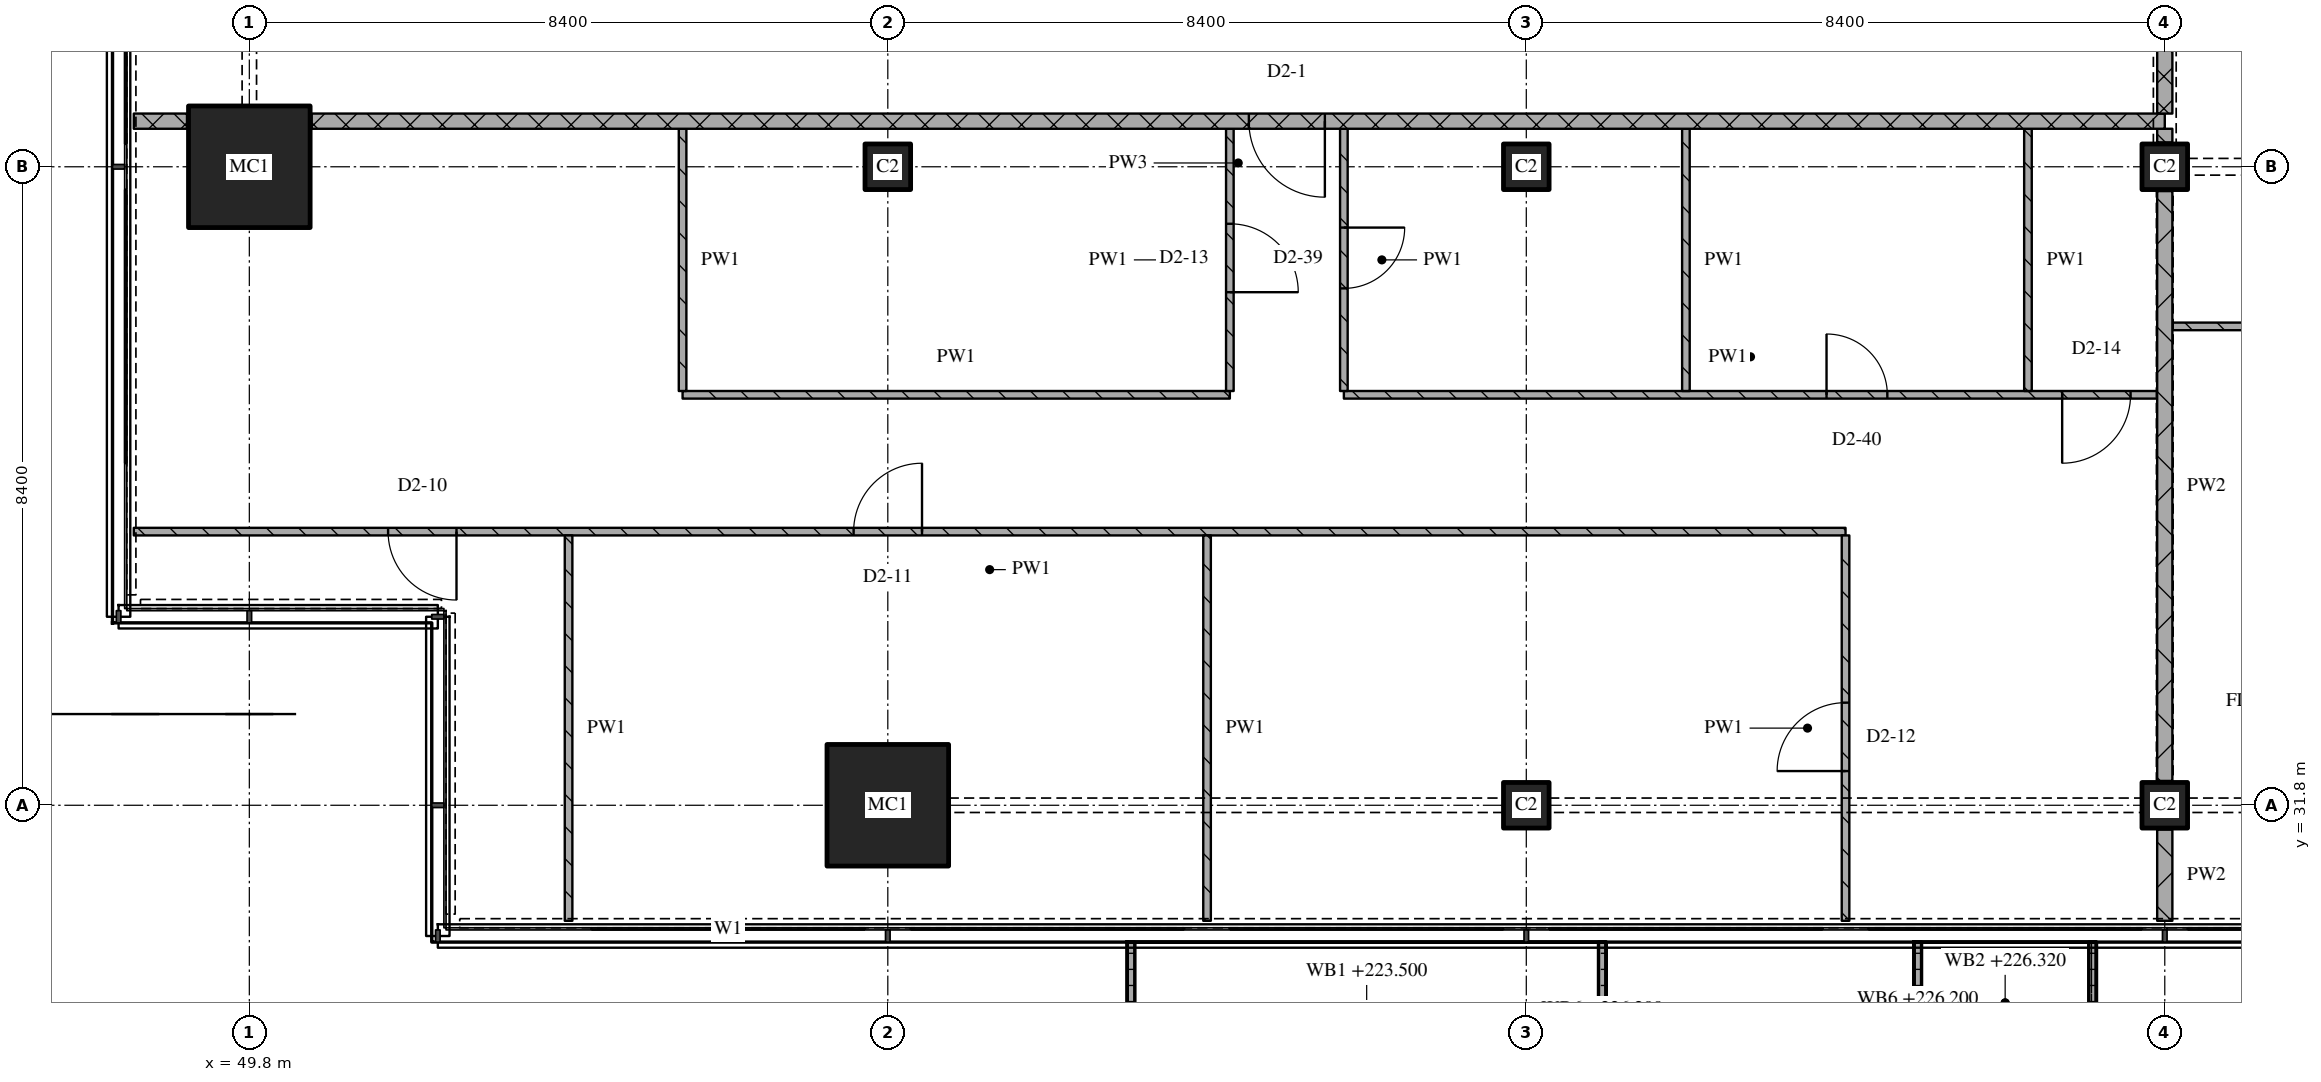
"""IFC4 building model, lengths in metres.
Left out: names, types, materials, properties, quantities, classifications, styles, units other than length and angle.
Written with IfcOpenShell. Run it as: python <this file> out.ifc"""

import sys

from ifc_helpers import new_model, si_unit, direction, frame, frame_2d, origin, origin_2d, place, context, subcontext, project, spatial, polyline, rectangle, outline, extrude, element, fill, save


model = new_model("IFC4")
c1 = context("Model", 3, precision=1e-05, world=origin(), true_north=direction((0.0, 1.0)))
c2 = subcontext(c1, "Body", "Model", "MODEL_VIEW")
j1 = project(units=[si_unit("LENGTHUNIT", "METRE"), si_unit("PLANEANGLEUNIT", "RADIAN")], contexts=[c1])
p1 = place(None, origin())
s1 = spatial("IfcSite", under=j1, at=p1, CompositionType="ELEMENT")
p2 = place(p1, origin())
s2 = spatial("IfcBuilding", under=s1, at=p2, CompositionType="ELEMENT")
p3 = place(p2, frame((0.0, 0.0, 223.5)))
s3 = spatial("IfcBuildingStorey", under=s2, at=p3, CompositionType="ELEMENT", Elevation=223.5)
for number, where, z_axis, x_axis in (
    (1, (49.8, 40.2, 0.0), (0.0, 0.0, 1.0), (1.0, 0.0, 0.0)),
    (2, (58.2, 31.8, 0.0), (0.0, 0.0, 1.0), (1.0, 0.0, 0.0)),
):
    element("IfcColumn", number, at=place(p3, frame(where, z_axis=z_axis, x_axis=x_axis)), inside=s3, PredefinedType="COLUMN", context=c2, shape_type="SweptSolid", body=[
        extrude(rectangle(XDim=1.6, YDim=1.6, at=origin_2d()), origin(), (0.0, 0.0, 1.0), 3.6),
    ])
for number, where, z_axis, x_axis in (
    (3, (58.2, 40.2, 0.0), (0.0, 0.0, 1.0), (1.0, 0.0, 0.0)),
    (4, (66.6, 31.8, 0.0), (0.0, 0.0, 1.0), (1.0, 0.0, 0.0)),
    (5, (66.6, 40.2, 0.0), (0.0, 0.0, 1.0), (1.0, 0.0, 0.0)),
    (6, (75.0, 31.8, 0.0), (0.0, 0.0, 1.0), (1.0, 0.0, 0.0)),
    (7, (75.0, 40.2, 0.0), (0.0, 0.0, 1.0), (1.0, 0.0, 0.0)),
):
    element("IfcColumn", number, at=place(p3, frame(where, z_axis=z_axis, x_axis=x_axis)), inside=s3, PredefinedType="COLUMN", context=c2, shape_type="SweptSolid", body=[
        extrude(rectangle(XDim=0.6, YDim=0.6, at=origin_2d()), origin(), (0.0, 0.0, 1.0), 3.6),
    ])
p4 = place(p3, origin())
e8 = element("IfcWall", 8, at=p4, inside=s3, PredefinedType="SOLIDWALL", context=c2, shape_type="SweptSolid", body=[
    extrude(outline(polyline([(61.35, 30.0), (61.45, 30.0), (61.45, 28.233), (67.55, 28.233), (67.55, 30.0), (67.65, 30.0), (67.65, 28.133), (61.35, 28.133), (61.35, 30.0)])), origin(), (0.0, 0.0, 1.0), 1.0),
])
p5 = place(p3, origin())
e9 = element("IfcWall", 9, at=p5, inside=s3, PredefinedType="SOLIDWALL", context=c2, shape_type="SweptSolid", body=[
    extrude(outline(polyline([(71.7, 30.0), (71.8, 30.0), (71.8, 28.5), (74.0, 28.5), (74.0, 30.0), (74.1, 30.0), (74.1, 28.4), (71.7, 28.4), (71.7, 30.0)])), origin(), (0.0, 0.0, 1.0), 1.0),
])
p6 = place(p3, frame((70.8, 35.4, 0.0), z_axis=(0.0, 0.0, 1.0), x_axis=(-1.0, 0.0, 0.0)))
e10 = element("IfcWall", 10, at=p6, inside=s3, PredefinedType="PARTITIONING", context=c2, shape_type="SweptSolid", body=[
    extrude(rectangle(XDim=22.52, YDim=0.1, at=frame_2d((11.26, 0.0))), origin(), (0.0, 0.0, 1.0), 3.32),
])
p7 = place(p6, frame((12.15, 0.0, 0.0)))
e11 = element("IfcOpeningElement", 11, at=p7, cuts=e10, PredefinedType="OPENING", context=c2, shape_type="SweptSolid", body=[
    extrude(rectangle(XDim=0.9, YDim=2.1, at=frame_2d((0.45, 1.05))), frame((0.0, 0.06, 0.0), z_axis=(0.0, -1.0, 0.0), x_axis=(1.0, 0.0, 0.0)), (0.0, 0.0, 1.0), 0.12),
])
p8 = place(p6, frame((18.274, 0.0, 0.0)))
e12 = element("IfcOpeningElement", 12, at=p8, cuts=e10, PredefinedType="OPENING", context=c2, shape_type="SweptSolid", body=[
    extrude(rectangle(XDim=0.9, YDim=2.1, at=frame_2d((0.45, 1.05))), frame((0.0, 0.06, 0.0), z_axis=(0.0, -1.0, 0.0), x_axis=(1.0, 0.0, 0.0)), (0.0, 0.0, 1.0), 0.12),
])
p9 = place(p3, frame((55.5, 37.2, 0.0), z_axis=(0.0, 0.0, 1.0), x_axis=(1.0, 0.0, 0.0)))
e13 = element("IfcWall", 13, at=p9, inside=s3, PredefinedType="PARTITIONING", context=c2, shape_type="SweptSolid", body=[
    extrude(rectangle(XDim=7.2, YDim=0.1, at=frame_2d((3.6, 0.0))), origin(), (0.0, 0.0, 1.0), 3.32),
])
p10 = place(p3, frame((64.2, 37.2, 0.0), z_axis=(0.0, 0.0, 1.0), x_axis=(1.0, 0.0, 0.0)))
e14 = element("IfcWall", 14, at=p10, inside=s3, PredefinedType="PARTITIONING", context=c2, shape_type="SweptSolid", body=[
    extrude(rectangle(XDim=10.7, YDim=0.1, at=frame_2d((5.35, 0.0))), origin(), (0.0, 0.0, 1.0), 3.32),
])
p11 = place(p10, frame((6.35, 0.0, 0.0)))
e15 = element("IfcOpeningElement", 15, at=p11, cuts=e14, PredefinedType="OPENING", context=c2, shape_type="SweptSolid", body=[
    extrude(rectangle(XDim=0.8, YDim=2.1, at=frame_2d((0.4, 1.05))), frame((0.0, 0.06, 0.0), z_axis=(0.0, -1.0, 0.0), x_axis=(1.0, 0.0, 0.0)), (0.0, 0.0, 1.0), 0.12),
])
p12 = place(p10, frame((9.45, 0.0, 0.0)))
e16 = element("IfcOpeningElement", 16, at=p12, cuts=e14, PredefinedType="OPENING", context=c2, shape_type="SweptSolid", body=[
    extrude(rectangle(XDim=0.9, YDim=2.1, at=frame_2d((0.45, 1.05))), frame((0.0, 0.06, 0.0), z_axis=(0.0, -1.0, 0.0), x_axis=(1.0, 0.0, 0.0)), (0.0, 0.0, 1.0), 0.12),
])
p13 = place(p3, frame((75.1, 38.1, 0.0), z_axis=(0.0, 0.0, 1.0), x_axis=(1.0, 0.0, 0.0)))
e17 = element("IfcWall", 17, at=p13, inside=s3, PredefinedType="PARTITIONING", context=c2, shape_type="SweptSolid", body=[
    extrude(rectangle(XDim=11.3, YDim=0.1, at=frame_2d((5.65, 0.0))), origin(), (0.0, 0.0, 1.0), 3.32),
])
p14 = place(p13, frame((1.75, 0.0, 0.0)))
e18 = element("IfcOpeningElement", 18, at=p14, cuts=e17, PredefinedType="OPENING", context=c2, shape_type="SweptSolid", body=[
    extrude(rectangle(XDim=0.8, YDim=2.1, at=frame_2d((0.4, 1.05))), frame((0.0, 0.06, 0.0), z_axis=(0.0, -1.0, 0.0), x_axis=(1.0, 0.0, 0.0)), (0.0, 0.0, 1.0), 0.12),
])
p15 = place(p13, frame((6.25, 0.0, 0.0)))
e19 = element("IfcOpeningElement", 19, at=p15, cuts=e17, PredefinedType="OPENING", context=c2, shape_type="SweptSolid", body=[
    extrude(rectangle(XDim=0.8, YDim=2.1, at=frame_2d((0.4, 1.05))), frame((0.0, 0.06, 0.0), z_axis=(0.0, -1.0, 0.0), x_axis=(1.0, 0.0, 0.0)), (0.0, 0.0, 1.0), 0.12),
])
p16 = place(p13, frame((9.65, 0.0, 0.0)))
e20 = element("IfcOpeningElement", 20, at=p16, cuts=e17, PredefinedType="OPENING", context=c2, shape_type="SweptSolid", body=[
    extrude(rectangle(XDim=0.9, YDim=2.1, at=frame_2d((0.45, 1.05))), frame((0.0, 0.06, 0.0), z_axis=(0.0, -1.0, 0.0), x_axis=(1.0, 0.0, 0.0)), (0.0, 0.0, 1.0), 0.12),
])
p17 = place(p3, frame((48.28, 40.8, 0.0), z_axis=(0.0, 0.0, 1.0), x_axis=(1.0, 0.0, 0.0)))
e21 = element("IfcWall", 21, at=p17, inside=s3, PredefinedType="PARTITIONING", context=c2, shape_type="SweptSolid", body=[
    extrude(rectangle(XDim=0.7, YDim=0.2, at=frame_2d((0.35, 0.0))), origin(), (0.0, 0.0, 1.0), 3.32),
])
p18 = place(p3, frame((75.0, 40.8, 0.0), z_axis=(0.0, 0.0, 1.0), x_axis=(-1.0, 0.0, 0.0)))
e22 = element("IfcWall", 22, at=p18, inside=s3, PredefinedType="PARTITIONING", context=c2, shape_type="SweptSolid", body=[
    extrude(rectangle(XDim=24.38, YDim=0.2, at=frame_2d((12.19, 0.0))), origin(), (0.0, 0.0, 1.0), 3.32),
])
p19 = place(p18, frame((11.05, 0.0, 0.0)))
e23 = element("IfcOpeningElement", 23, at=p19, cuts=e22, PredefinedType="OPENING", context=c2, shape_type="SweptSolid", body=[
    extrude(rectangle(XDim=1.0, YDim=2.1, at=frame_2d((0.5, 1.05))), frame((0.0, 0.11, 0.0), z_axis=(0.0, -1.0, 0.0), x_axis=(1.0, 0.0, 0.0)), (0.0, 0.0, 1.0), 0.22),
])
p20 = place(p3, frame((54.0, 35.35, 0.0), z_axis=(0.0, 0.0, 1.0), x_axis=(0.0, -1.0, 0.0)))
e24 = element("IfcWall", 24, at=p20, inside=s3, PredefinedType="PARTITIONING", context=c2, shape_type="SweptSolid", body=[
    extrude(rectangle(XDim=5.07, YDim=0.1, at=frame_2d((2.535, 0.0))), origin(), (0.0, 0.0, 1.0), 3.32),
])
p21 = place(p3, frame((55.5, 40.7, 0.0), z_axis=(0.0, 0.0, 1.0), x_axis=(0.0, -1.0, 0.0)))
e25 = element("IfcWall", 25, at=p21, inside=s3, PredefinedType="PARTITIONING", context=c2, shape_type="SweptSolid", body=[
    extrude(rectangle(XDim=3.45, YDim=0.1, at=frame_2d((1.725, 0.0))), origin(), (0.0, 0.0, 1.0), 3.32),
])
p22 = place(p3, frame((62.4, 35.35, 0.0), z_axis=(0.0, 0.0, 1.0), x_axis=(0.0, -1.0, 0.0)))
e26 = element("IfcWall", 26, at=p22, inside=s3, PredefinedType="PARTITIONING", context=c2, shape_type="SweptSolid", body=[
    extrude(rectangle(XDim=5.07, YDim=0.1, at=frame_2d((2.535, 0.0))), origin(), (0.0, 0.0, 1.0), 3.32),
])
p23 = place(p3, frame((62.7, 37.25, 0.0), z_axis=(0.0, 0.0, 1.0), x_axis=(0.0, 1.0, 0.0)))
e27 = element("IfcWall", 27, at=p23, inside=s3, PredefinedType="PARTITIONING", context=c2, shape_type="SweptSolid", body=[
    extrude(rectangle(XDim=3.45, YDim=0.1, at=frame_2d((1.725, 0.0))), origin(), (0.0, 0.0, 1.0), 3.32),
])
p24 = place(p23, frame((1.3, 0.0, 0.0)))
e28 = element("IfcOpeningElement", 28, at=p24, cuts=e27, PredefinedType="OPENING", context=c2, shape_type="SweptSolid", body=[
    extrude(rectangle(XDim=0.9, YDim=2.1, at=frame_2d((0.45, 1.05))), frame((0.0, 0.06, 0.0), z_axis=(0.0, -1.0, 0.0), x_axis=(1.0, 0.0, 0.0)), (0.0, 0.0, 1.0), 0.12),
])
p25 = place(p3, frame((64.2, 40.7, 0.0), z_axis=(0.0, 0.0, 1.0), x_axis=(0.0, -1.0, 0.0)))
e29 = element("IfcWall", 29, at=p25, inside=s3, PredefinedType="PARTITIONING", context=c2, shape_type="SweptSolid", body=[
    extrude(rectangle(XDim=3.45, YDim=0.1, at=frame_2d((1.725, 0.0))), origin(), (0.0, 0.0, 1.0), 3.32),
])
p26 = place(p25, frame((1.3, 0.0, 0.0)))
e30 = element("IfcOpeningElement", 30, at=p26, cuts=e29, PredefinedType="OPENING", context=c2, shape_type="SweptSolid", body=[
    extrude(rectangle(XDim=0.8, YDim=2.1, at=frame_2d((0.4, 1.05))), frame((0.0, 0.06, 0.0), z_axis=(0.0, -1.0, 0.0), x_axis=(1.0, 0.0, 0.0)), (0.0, 0.0, 1.0), 0.12),
])
p27 = place(p3, frame((68.7, 40.7, 0.0), z_axis=(0.0, 0.0, 1.0), x_axis=(0.0, -1.0, 0.0)))
e31 = element("IfcWall", 31, at=p27, inside=s3, PredefinedType="PARTITIONING", context=c2, shape_type="SweptSolid", body=[
    extrude(rectangle(XDim=3.45, YDim=0.1, at=frame_2d((1.725, 0.0))), origin(), (0.0, 0.0, 1.0), 3.32),
])
p28 = place(p3, frame((70.8, 30.28, 0.0), z_axis=(0.0, 0.0, 1.0), x_axis=(0.0, 1.0, 0.0)))
e32 = element("IfcWall", 32, at=p28, inside=s3, PredefinedType="PARTITIONING", context=c2, shape_type="SweptSolid", body=[
    extrude(rectangle(XDim=5.07, YDim=0.1, at=frame_2d((2.535, 0.0))), origin(), (0.0, 0.0, 1.0), 3.32),
])
p29 = place(p28, frame((1.97, 0.0, 0.0)))
e33 = element("IfcOpeningElement", 33, at=p29, cuts=e32, PredefinedType="OPENING", context=c2, shape_type="SweptSolid", body=[
    extrude(rectangle(XDim=0.9, YDim=2.1, at=frame_2d((0.45, 1.05))), frame((0.0, 0.06, 0.0), z_axis=(0.0, -1.0, 0.0), x_axis=(1.0, 0.0, 0.0)), (0.0, 0.0, 1.0), 0.12),
])
p30 = place(p3, frame((73.2, 40.7, 0.0), z_axis=(0.0, 0.0, 1.0), x_axis=(0.0, -1.0, 0.0)))
e34 = element("IfcWall", 34, at=p30, inside=s3, PredefinedType="PARTITIONING", context=c2, shape_type="SweptSolid", body=[
    extrude(rectangle(XDim=3.45, YDim=0.1, at=frame_2d((1.725, 0.0))), origin(), (0.0, 0.0, 1.0), 3.32),
])
p31 = place(p3, frame((75.0, 43.1, 0.0), z_axis=(0.0, 0.0, 1.0), x_axis=(0.0, -1.0, 0.0)))
e35 = element("IfcWall", 35, at=p31, inside=s3, PredefinedType="PARTITIONING", context=c2, shape_type="SweptSolid", body=[
    extrude(rectangle(XDim=2.2, YDim=0.2, at=frame_2d((1.1, 0.0))), origin(), (0.0, 0.0, 1.0), 2.53),
])
p32 = place(p3, frame((75.0, 31.48, 0.0), z_axis=(0.0, 0.0, 1.0), x_axis=(0.0, -1.0, 0.0)))
e36 = element("IfcWall", 36, at=p32, inside=s3, PredefinedType="PARTITIONING", context=c2, shape_type="SweptSolid", body=[
    extrude(rectangle(XDim=1.2, YDim=0.2, at=frame_2d((0.6, 0.0))), origin(), (0.0, 0.0, 1.0), 3.32),
])
p33 = place(p3, frame((75.0, 39.88, 0.0), z_axis=(0.0, 0.0, 1.0), x_axis=(0.0, -1.0, 0.0)))
e37 = element("IfcWall", 37, at=p33, inside=s3, PredefinedType="PARTITIONING", context=c2, shape_type="SweptSolid", body=[
    extrude(rectangle(XDim=7.76, YDim=0.2, at=frame_2d((3.88, 0.0))), origin(), (0.0, 0.0, 1.0), 2.72),
])
p34 = place(p3, frame((75.0, 40.7, 0.0), z_axis=(0.0, 0.0, 1.0), x_axis=(0.0, -1.0, 0.0)))
e38 = element("IfcWall", 38, at=p34, inside=s3, PredefinedType="PARTITIONING", context=c2, shape_type="SweptSolid", body=[
    extrude(rectangle(XDim=0.18, YDim=0.2, at=frame_2d((0.09, 0.0))), origin(), (0.0, 0.0, 1.0), 3.32),
])
p35 = place(p7, origin())
e39 = element("IfcDoor", 39, at=p35, inside=s3, OperationType="SINGLE_SWING_RIGHT", PredefinedType="DOOR", context=c2, shape_type="SweptSolid", body=[
    extrude(rectangle(XDim=0.9, YDim=2.1, at=frame_2d((0.45, 1.05))), frame((0.0, 0.025, 0.0), z_axis=(0.0, -1.0, 0.0), x_axis=(1.0, 0.0, 0.0)), (0.0, 0.0, 1.0), 0.05),
])
fill(e11, e39)
p36 = place(p8, origin())
e40 = element("IfcDoor", 40, at=p36, inside=s3, OperationType="SINGLE_SWING_LEFT", PredefinedType="DOOR", context=c2, shape_type="SweptSolid", body=[
    extrude(rectangle(XDim=0.9, YDim=2.1, at=frame_2d((0.45, 1.05))), frame((0.0, 0.025, 0.0), z_axis=(0.0, -1.0, 0.0), x_axis=(1.0, 0.0, 0.0)), (0.0, 0.0, 1.0), 0.05),
])
fill(e12, e40)
p37 = place(p11, origin())
e41 = element("IfcDoor", 41, at=p37, inside=s3, OperationType="SINGLE_SWING_LEFT", PredefinedType="DOOR", context=c2, shape_type="SweptSolid", body=[
    extrude(rectangle(XDim=0.8, YDim=2.1, at=frame_2d((0.4, 1.05))), frame((0.0, 0.025, 0.0), z_axis=(0.0, -1.0, 0.0), x_axis=(1.0, 0.0, 0.0)), (0.0, 0.0, 1.0), 0.05),
])
fill(e15, e41)
p38 = place(p12, origin())
e42 = element("IfcDoor", 42, at=p38, inside=s3, OperationType="SINGLE_SWING_RIGHT", PredefinedType="DOOR", context=c2, shape_type="SweptSolid", body=[
    extrude(rectangle(XDim=0.9, YDim=2.1, at=frame_2d((0.45, 1.05))), frame((0.0, 0.025, 0.0), z_axis=(0.0, -1.0, 0.0), x_axis=(1.0, 0.0, 0.0)), (0.0, 0.0, 1.0), 0.05),
])
fill(e16, e42)
p39 = place(p19, origin())
e43 = element("IfcDoor", 43, at=p39, inside=s3, OperationType="SINGLE_SWING_LEFT", PredefinedType="DOOR", context=c2, shape_type="SweptSolid", body=[
    extrude(rectangle(XDim=1.0, YDim=2.1, at=frame_2d((0.5, 1.05))), frame((0.0, 0.025, 0.0), z_axis=(0.0, -1.0, 0.0), x_axis=(1.0, 0.0, 0.0)), (0.0, 0.0, 1.0), 0.05),
])
fill(e23, e43)
p40 = place(p24, origin())
e44 = element("IfcDoor", 44, at=p40, inside=s3, OperationType="SINGLE_SWING_RIGHT", PredefinedType="DOOR", context=c2, shape_type="SweptSolid", body=[
    extrude(rectangle(XDim=0.9, YDim=2.1, at=frame_2d((0.45, 1.05))), frame((0.0, 0.025, 0.0), z_axis=(0.0, -1.0, 0.0), x_axis=(1.0, 0.0, 0.0)), (0.0, 0.0, 1.0), 0.05),
])
fill(e28, e44)
p41 = place(p26, origin())
e45 = element("IfcDoor", 45, at=p41, inside=s3, OperationType="SINGLE_SWING_LEFT", PredefinedType="DOOR", context=c2, shape_type="SweptSolid", body=[
    extrude(rectangle(XDim=0.8, YDim=2.1, at=frame_2d((0.4, 1.05))), frame((0.0, 0.025, 0.0), z_axis=(0.0, -1.0, 0.0), x_axis=(1.0, 0.0, 0.0)), (0.0, 0.0, 1.0), 0.05),
])
fill(e30, e45)
p42 = place(p29, origin())
e46 = element("IfcDoor", 46, at=p42, inside=s3, OperationType="SINGLE_SWING_LEFT", PredefinedType="DOOR", context=c2, shape_type="SweptSolid", body=[
    extrude(rectangle(XDim=0.9, YDim=2.1, at=frame_2d((0.45, 1.05))), frame((0.0, 0.025, 0.0), z_axis=(0.0, -1.0, 0.0), x_axis=(1.0, 0.0, 0.0)), (0.0, 0.0, 1.0), 0.05),
])
fill(e33, e46)
save(model, sys.argv[1])
